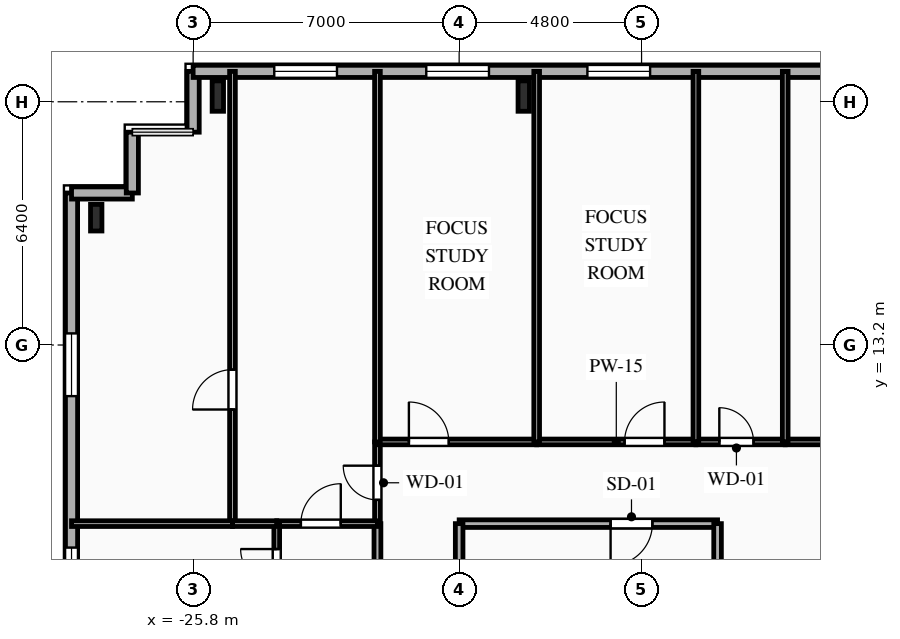
"""IFC4 building model, lengths in metres.
Left out: names, types, materials, properties, quantities, classifications, styles, units other than length and angle.
Written with IfcOpenShell. Run it as: python <this file> out.ifc"""

import sys

from ifc_helpers import new_model, si_unit, direction, frame, frame_2d, origin, origin_2d, place, context, subcontext, project, spatial, rectangle, i_section, extrude, element, fill, save


model = new_model("IFC4")
c1 = context("Model", 3, precision=1e-05, world=origin(), true_north=direction((0.0, 1.0)))
c2 = subcontext(c1, "Body", "Model", "MODEL_VIEW")
j1 = project(units=[si_unit("LENGTHUNIT", "METRE"), si_unit("PLANEANGLEUNIT", "RADIAN")], contexts=[c1])
p1 = place(None, origin())
s1 = spatial("IfcSite", under=j1, at=p1, CompositionType="ELEMENT")
p2 = place(p1, origin())
s2 = spatial("IfcBuilding", under=s1, at=p2, CompositionType="ELEMENT")
p3 = place(p2, frame((0.0, 0.0, 131.0)))
s3 = spatial("IfcBuildingStorey", under=s2, at=p3, CompositionType="ELEMENT", Elevation=131.0)
for number, where, z_axis, x_axis in (
    (1, (-17.1, 19.75, 0.0), (0.0, 0.0, 1.0), (1.0, 0.0, 0.0)),
    (2, (-25.15, 19.75, 0.0), (0.0, 0.0, 1.0), (1.0, 0.0, 0.0)),
):
    element("IfcColumn", number, at=place(p3, frame(where, z_axis=z_axis, x_axis=x_axis)), inside=s3, PredefinedType="COLUMN", context=c2, shape_type="SweptSolid", body=[
        extrude(i_section(OverallWidth=0.3, OverallDepth=0.8, WebThickness=0.018, FlangeThickness=0.033, FilletRadius=0.03, at=origin_2d()), origin(), (0.0, 0.0, 1.0), 3.35),
    ])
p4 = place(p3, frame((-28.35, 16.55, 0.0), z_axis=(0.0, 0.0, 1.0), x_axis=(1.0, 0.0, 0.0)))
e3 = element("IfcColumn", 3, at=p4, inside=s3, PredefinedType="COLUMN", context=c2, shape_type="SweptSolid", body=[
    extrude(i_section(OverallWidth=0.3, OverallDepth=0.7, WebThickness=0.017, FlangeThickness=0.032, FilletRadius=0.027, at=origin_2d()), origin(), (0.0, 0.0, 1.0), 3.35),
])
p5 = place(p3, frame((-29.0, -12.4, 0.0), z_axis=(0.0, 0.0, 1.0), x_axis=(0.0, 1.0, 0.0)))
e4 = element("IfcWall", 4, at=p5, inside=s3, PredefinedType="SOLIDWALL", context=c2, shape_type="SweptSolid", body=[
    extrude(rectangle(XDim=29.6, YDim=0.32, at=frame_2d((14.8, 0.0))), origin(), (0.0, 0.0, 1.0), 3.04),
])
p6 = place(p5, frame((2.855, 0.0, 0.85)))
e5 = element("IfcOpeningElement", 5, at=p6, cuts=e4, PredefinedType="OPENING", context=c2, shape_type="SweptSolid", body=[
    extrude(rectangle(XDim=1.65, YDim=1.85, at=frame_2d((0.825, 0.925))), frame((0.0, 0.17, 0.0), z_axis=(0.0, -1.0, 0.0), x_axis=(1.0, 0.0, 0.0)), (0.0, 0.0, 1.0), 0.34),
])
p7 = place(p5, frame((9.865, 0.0, 0.85)))
e6 = element("IfcOpeningElement", 6, at=p7, cuts=e4, PredefinedType="OPENING", context=c2, shape_type="SweptSolid", body=[
    extrude(rectangle(XDim=1.95, YDim=1.85, at=frame_2d((0.975, 0.925))), frame((0.0, 0.17, 0.0), z_axis=(0.0, -1.0, 0.0), x_axis=(1.0, 0.0, 0.0)), (0.0, 0.0, 1.0), 0.34),
])
p8 = place(p5, frame((13.13, 0.0, 0.85)))
e7 = element("IfcOpeningElement", 7, at=p8, cuts=e4, PredefinedType="OPENING", context=c2, shape_type="SweptSolid", body=[
    extrude(rectangle(XDim=1.5, YDim=1.85, at=frame_2d((0.75, 0.925))), frame((0.0, 0.17, 0.0), z_axis=(0.0, -1.0, 0.0), x_axis=(1.0, 0.0, 0.0)), (0.0, 0.0, 1.0), 0.34),
])
p9 = place(p5, frame((15.93, 0.0, 0.85)))
e8 = element("IfcOpeningElement", 8, at=p9, cuts=e4, PredefinedType="OPENING", context=c2, shape_type="SweptSolid", body=[
    extrude(rectangle(XDim=1.5, YDim=1.85, at=frame_2d((0.75, 0.925))), frame((0.0, 0.17, 0.0), z_axis=(0.0, -1.0, 0.0), x_axis=(1.0, 0.0, 0.0)), (0.0, 0.0, 1.0), 0.34),
])
p10 = place(p5, frame((18.77, 0.0, 0.85)))
e9 = element("IfcOpeningElement", 9, at=p10, cuts=e4, PredefinedType="OPENING", context=c2, shape_type="SweptSolid", body=[
    extrude(rectangle(XDim=1.5, YDim=1.85, at=frame_2d((0.75, 0.925))), frame((0.0, 0.17, 0.0), z_axis=(0.0, -1.0, 0.0), x_axis=(1.0, 0.0, 0.0)), (0.0, 0.0, 1.0), 0.34),
])
p11 = place(p5, frame((24.255, 0.0, 0.85)))
e10 = element("IfcOpeningElement", 10, at=p11, cuts=e4, PredefinedType="OPENING", context=c2, shape_type="SweptSolid", body=[
    extrude(rectangle(XDim=1.65, YDim=1.85, at=frame_2d((0.825, 0.925))), frame((0.0, 0.17, 0.0), z_axis=(0.0, -1.0, 0.0), x_axis=(1.0, 0.0, 0.0)), (0.0, 0.0, 1.0), 0.34),
])
for number, where, z_axis, x_axis in (
    (11, (-29.0, 17.2, 0.0), (0.0, 0.0, 1.0), (1.0, 0.0, 0.0)),
    (12, (-27.4, 17.2, 0.0), (0.0, 0.0, 1.0), (0.0, 1.0, 0.0)),
):
    element("IfcWall", number, at=place(p3, frame(where, z_axis=z_axis, x_axis=x_axis)), inside=s3, PredefinedType="SOLIDWALL", context=c2, shape_type="SweptSolid", body=[
        extrude(rectangle(XDim=1.6, YDim=0.32, at=frame_2d((0.8, 0.0))), origin(), (0.0, 0.0, 1.0), 3.04),
    ])
p12 = place(p3, frame((-25.8, 18.8, 0.0), z_axis=(0.0, 0.0, 1.0), x_axis=(0.0, 1.0, 0.0)))
e13 = element("IfcWall", 13, at=p12, inside=s3, PredefinedType="SOLIDWALL", context=c2, shape_type="SweptSolid", body=[
    extrude(rectangle(XDim=1.6, YDim=0.32, at=frame_2d((0.8, 0.0))), origin(), (0.0, 0.0, 1.0), 3.04),
])
p13 = place(p3, frame((-25.8, 20.4, 0.0), z_axis=(0.0, 0.0, 1.0), x_axis=(1.0, 0.0, 0.0)))
e14 = element("IfcWall", 14, at=p13, inside=s3, PredefinedType="SOLIDWALL", context=c2, shape_type="SweptSolid", body=[
    extrude(rectangle(XDim=49.6, YDim=0.32, at=frame_2d((24.8, 0.0))), origin(), (0.0, 0.0, 1.0), 3.04),
])
p14 = place(p13, frame((47.4, 0.0, 0.0)))
e15 = element("IfcOpeningElement", 15, at=p14, cuts=e14, PredefinedType="OPENING", context=c2, shape_type="SweptSolid", body=[
    extrude(rectangle(XDim=1.2, YDim=2.2, at=frame_2d((0.6, 1.1))), frame((0.0, 0.17, 0.0), z_axis=(0.0, -1.0, 0.0), x_axis=(1.0, 0.0, 0.0)), (0.0, 0.0, 1.0), 0.34),
])
p15 = place(p13, frame((2.135, 0.0, 0.85)))
e16 = element("IfcOpeningElement", 16, at=p15, cuts=e14, PredefinedType="OPENING", context=c2, shape_type="SweptSolid", body=[
    extrude(rectangle(XDim=1.65, YDim=1.85, at=frame_2d((0.825, 0.925))), frame((0.0, 0.17, 0.0), z_axis=(0.0, -1.0, 0.0), x_axis=(1.0, 0.0, 0.0)), (0.0, 0.0, 1.0), 0.34),
])
p16 = place(p13, frame((6.135, 0.0, 0.85)))
e17 = element("IfcOpeningElement", 17, at=p16, cuts=e14, PredefinedType="OPENING", context=c2, shape_type="SweptSolid", body=[
    extrude(rectangle(XDim=1.65, YDim=1.85, at=frame_2d((0.825, 0.925))), frame((0.0, 0.17, 0.0), z_axis=(0.0, -1.0, 0.0), x_axis=(1.0, 0.0, 0.0)), (0.0, 0.0, 1.0), 0.34),
])
p17 = place(p13, frame((10.375, 0.0, 0.85)))
e18 = element("IfcOpeningElement", 18, at=p17, cuts=e14, PredefinedType="OPENING", context=c2, shape_type="SweptSolid", body=[
    extrude(rectangle(XDim=1.65, YDim=1.85, at=frame_2d((0.825, 0.925))), frame((0.0, 0.17, 0.0), z_axis=(0.0, -1.0, 0.0), x_axis=(1.0, 0.0, 0.0)), (0.0, 0.0, 1.0), 0.34),
])
p18 = place(p13, frame((17.89, 0.0, 0.85)))
e19 = element("IfcOpeningElement", 19, at=p18, cuts=e14, PredefinedType="OPENING", context=c2, shape_type="SweptSolid", body=[
    extrude(rectangle(XDim=1.5, YDim=1.85, at=frame_2d((0.75, 0.925))), frame((0.0, 0.17, 0.0), z_axis=(0.0, -1.0, 0.0), x_axis=(1.0, 0.0, 0.0)), (0.0, 0.0, 1.0), 0.34),
])
p19 = place(p13, frame((25.592, 0.0, 0.85)))
e20 = element("IfcOpeningElement", 20, at=p19, cuts=e14, PredefinedType="OPENING", context=c2, shape_type="SweptSolid", body=[
    extrude(rectangle(XDim=2.2, YDim=1.85, at=frame_2d((1.1, 0.925))), frame((0.0, 0.17, 0.0), z_axis=(0.0, -1.0, 0.0), x_axis=(1.0, 0.0, 0.0)), (0.0, 0.0, 1.0), 0.34),
])
p20 = place(p13, frame((33.1, 0.0, 0.85)))
e21 = element("IfcOpeningElement", 21, at=p20, cuts=e14, PredefinedType="OPENING", context=c2, shape_type="SweptSolid", body=[
    extrude(rectangle(XDim=2.2, YDim=1.85, at=frame_2d((1.1, 0.925))), frame((0.0, 0.17, 0.0), z_axis=(0.0, -1.0, 0.0), x_axis=(1.0, 0.0, 0.0)), (0.0, 0.0, 1.0), 0.34),
])
p21 = place(p13, frame((39.092, 0.0, 0.85)))
e22 = element("IfcOpeningElement", 22, at=p21, cuts=e14, PredefinedType="OPENING", context=c2, shape_type="SweptSolid", body=[
    extrude(rectangle(XDim=1.65, YDim=1.85, at=frame_2d((0.825, 0.925))), frame((0.0, 0.17, 0.0), z_axis=(0.0, -1.0, 0.0), x_axis=(1.0, 0.0, 0.0)), (0.0, 0.0, 1.0), 0.34),
])
p22 = place(p13, frame((43.855, 0.0, 0.85)))
e23 = element("IfcOpeningElement", 23, at=p22, cuts=e14, PredefinedType="OPENING", context=c2, shape_type="SweptSolid", body=[
    extrude(rectangle(XDim=1.65, YDim=1.85, at=frame_2d((0.825, 0.925))), frame((0.0, 0.17, 0.0), z_axis=(0.0, -1.0, 0.0), x_axis=(1.0, 0.0, 0.0)), (0.0, 0.0, 1.0), 0.34),
])
p23 = place(p3, frame((-12.0, 8.5, 0.0), z_axis=(0.0, 0.0, 1.0), x_axis=(-1.0, 0.0, 0.0)))
e24 = element("IfcWall", 24, at=p23, inside=s3, PredefinedType="PARTITIONING", context=c2, shape_type="SweptSolid", body=[
    extrude(rectangle(XDim=6.8, YDim=0.2, at=frame_2d((3.4, 0.0))), origin(), (0.0, 0.0, 1.0), 3.04),
])
p24 = place(p23, frame((1.715, 0.0, 0.0)))
e25 = element("IfcOpeningElement", 25, at=p24, cuts=e24, PredefinedType="OPENING", context=c2, shape_type="SweptSolid", body=[
    extrude(rectangle(XDim=1.1, YDim=2.15, at=frame_2d((0.55, 1.075))), frame((0.0, 0.11, 0.0), z_axis=(0.0, -1.0, 0.0), x_axis=(1.0, 0.0, 0.0)), (0.0, 0.0, 1.0), 0.22),
])
p25 = place(p3, frame((-18.8, 8.5, 0.0), z_axis=(0.0, 0.0, 1.0), x_axis=(0.0, -1.0, 0.0)))
e26 = element("IfcWall", 26, at=p25, inside=s3, PredefinedType="PARTITIONING", context=c2, shape_type="SweptSolid", body=[
    extrude(rectangle(XDim=2.9, YDim=0.2, at=frame_2d((1.45, 0.0))), origin(), (0.0, 0.0, 1.0), 2.525),
])
p26 = place(p3, frame((-12.0, 5.6, 0.0), z_axis=(0.0, 0.0, 1.0), x_axis=(0.0, 1.0, 0.0)))
e27 = element("IfcWall", 27, at=p26, inside=s3, PredefinedType="PARTITIONING", context=c2, shape_type="SweptSolid", body=[
    extrude(rectangle(XDim=2.9, YDim=0.2, at=frame_2d((1.45, 0.0))), origin(), (0.0, 0.0, 1.0), 3.04),
])
p27 = place(p3, frame((-20.95, 8.5, 0.0), z_axis=(0.0, 0.0, 1.0), x_axis=(0.0, 1.0, 0.0)))
e28 = element("IfcWall", 28, at=p27, inside=s3, PredefinedType="PARTITIONING", context=c2, shape_type="SweptSolid", body=[
    extrude(rectangle(XDim=2.15, YDim=0.15, at=frame_2d((1.075, 0.0))), origin(), (0.0, 0.0, 1.0), 3.04),
])
p28 = place(p27, frame((0.625, 0.0, 0.0)))
e29 = element("IfcOpeningElement", 29, at=p28, cuts=e28, PredefinedType="OPENING", context=c2, shape_type="SweptSolid", body=[
    extrude(rectangle(XDim=0.9, YDim=2.1, at=frame_2d((0.45, 1.05))), frame((0.0, 0.085, 0.0), z_axis=(0.0, -1.0, 0.0), x_axis=(1.0, 0.0, 0.0)), (0.0, 0.0, 1.0), 0.17),
])
p29 = place(p3, frame((-20.95, 10.65, 0.0), z_axis=(0.0, 0.0, 1.0), x_axis=(1.0, 0.0, 0.0)))
e30 = element("IfcWall", 30, at=p29, inside=s3, PredefinedType="PARTITIONING", context=c2, shape_type="SweptSolid", body=[
    extrude(rectangle(XDim=4.19, YDim=0.15, at=frame_2d((2.095, 0.0))), origin(), (0.0, 0.0, 1.0), 3.04),
])
p30 = place(p29, frame((0.827, 0.0, 0.0)))
e31 = element("IfcOpeningElement", 31, at=p30, cuts=e30, PredefinedType="OPENING", context=c2, shape_type="SweptSolid", body=[
    extrude(rectangle(XDim=1.05, YDim=2.15, at=frame_2d((0.525, 1.075))), frame((0.0, 0.085, 0.0), z_axis=(0.0, -1.0, 0.0), x_axis=(1.0, 0.0, 0.0)), (0.0, 0.0, 1.0), 0.17),
])
p31 = place(p3, frame((-16.76, 10.65, 0.0), z_axis=(0.0, 0.0, 1.0), x_axis=(1.0, 0.0, 0.0)))
e32 = element("IfcWall", 32, at=p31, inside=s3, PredefinedType="PARTITIONING", context=c2, shape_type="SweptSolid", body=[
    extrude(rectangle(XDim=4.19, YDim=0.15, at=frame_2d((2.095, 0.0))), origin(), (0.0, 0.0, 1.0), 3.04),
])
p32 = place(p31, frame((2.312, 0.0, 0.0)))
e33 = element("IfcOpeningElement", 33, at=p32, cuts=e32, PredefinedType="OPENING", context=c2, shape_type="SweptSolid", body=[
    extrude(rectangle(XDim=1.05, YDim=2.15, at=frame_2d((0.525, 1.075))), frame((0.0, 0.085, 0.0), z_axis=(0.0, -1.0, 0.0), x_axis=(1.0, 0.0, 0.0)), (0.0, 0.0, 1.0), 0.17),
])
p33 = place(p3, frame((-12.57, 10.65, 0.0), z_axis=(0.0, 0.0, 1.0), x_axis=(1.0, 0.0, 0.0)))
e34 = element("IfcWall", 34, at=p33, inside=s3, PredefinedType="PLUMBINGWALL", context=c2, shape_type="SweptSolid", body=[
    extrude(rectangle(XDim=2.35, YDim=0.15, at=frame_2d((1.175, 0.0))), origin(), (0.0, 0.0, 1.0), 3.04),
])
p34 = place(p33, frame((0.616, 0.0, 0.0)))
e35 = element("IfcOpeningElement", 35, at=p34, cuts=e34, PredefinedType="OPENING", context=c2, shape_type="SweptSolid", body=[
    extrude(rectangle(XDim=0.9, YDim=2.1, at=frame_2d((0.45, 1.05))), frame((0.0, 0.085, 0.0), z_axis=(0.0, -1.0, 0.0), x_axis=(1.0, 0.0, 0.0)), (0.0, 0.0, 1.0), 0.17),
])
p35 = place(p3, frame((-10.22, 10.65, 0.0), z_axis=(0.0, 0.0, 1.0), x_axis=(1.0, 0.0, 0.0)))
e36 = element("IfcWall", 36, at=p35, inside=s3, PredefinedType="PARTITIONING", context=c2, shape_type="SweptSolid", body=[
    extrude(rectangle(XDim=6.03, YDim=0.15, at=frame_2d((3.015, 0.0))), origin(), (0.0, 0.0, 1.0), 3.04),
])
p36 = place(p35, frame((4.01, 0.0, 0.0)))
e37 = element("IfcOpeningElement", 37, at=p36, cuts=e36, PredefinedType="OPENING", context=c2, shape_type="SweptSolid", body=[
    extrude(rectangle(XDim=0.95, YDim=2.1, at=frame_2d((0.475, 1.05))), frame((0.0, 0.085, 0.0), z_axis=(0.0, -1.0, 0.0), x_axis=(1.0, 0.0, 0.0)), (0.0, 0.0, 1.0), 0.17),
])
p37 = place(p3, frame((-20.95, -5.6, 0.0), z_axis=(0.0, 0.0, 1.0), x_axis=(0.0, 1.0, 0.0)))
e38 = element("IfcWall", 38, at=p37, inside=s3, PredefinedType="PARTITIONING", context=c2, shape_type="SweptSolid", body=[
    extrude(rectangle(XDim=14.1, YDim=0.18, at=frame_2d((7.05, 0.0))), origin(), (0.0, 0.0, 1.0), 3.04),
])
p38 = place(p37, frame((5.058, 0.0, 0.0)))
e39 = element("IfcOpeningElement", 39, at=p38, cuts=e38, PredefinedType="OPENING", context=c2, shape_type="SweptSolid", body=[
    extrude(rectangle(XDim=1.0, YDim=2.15, at=frame_2d((0.5, 1.075))), frame((0.0, 0.1, 0.0), z_axis=(0.0, -1.0, 0.0), x_axis=(1.0, 0.0, 0.0)), (0.0, 0.0, 1.0), 0.2),
])
p39 = place(p3, frame((-23.6, 8.5, 0.0), z_axis=(0.0, 0.0, 1.0), x_axis=(1.0, 0.0, 0.0)))
e40 = element("IfcWall", 40, at=p39, inside=s3, PredefinedType="PARTITIONING", context=c2, shape_type="SweptSolid", body=[
    extrude(rectangle(XDim=2.65, YDim=0.15, at=frame_2d((1.325, 0.0))), origin(), (0.0, 0.0, 1.0), 3.04),
])
p40 = place(p39, frame((0.635, 0.0, 0.0)))
e41 = element("IfcOpeningElement", 41, at=p40, cuts=e40, PredefinedType="OPENING", context=c2, shape_type="SweptSolid", body=[
    extrude(rectangle(XDim=1.05, YDim=2.15, at=frame_2d((0.525, 1.075))), frame((0.0, 0.085, 0.0), z_axis=(0.0, -1.0, 0.0), x_axis=(1.0, 0.0, 0.0)), (0.0, 0.0, 1.0), 0.17),
])
p41 = place(p3, frame((-23.6, 5.68, 0.0), z_axis=(0.0, 0.0, 1.0), x_axis=(0.0, 1.0, 0.0)))
e42 = element("IfcWall", 42, at=p41, inside=s3, PredefinedType="PARTITIONING", context=c2, shape_type="SweptSolid", body=[
    extrude(rectangle(XDim=2.82, YDim=0.15, at=frame_2d((1.41, 0.0))), origin(), (0.0, 0.0, 1.0), 2.695),
])
p42 = place(p41, frame((1.201, 0.0, 0.0)))
e43 = element("IfcOpeningElement", 43, at=p42, cuts=e42, PredefinedType="OPENING", context=c2, shape_type="SweptSolid", body=[
    extrude(rectangle(XDim=0.95, YDim=2.1, at=frame_2d((0.475, 1.05))), frame((0.0, 0.085, 0.0), z_axis=(0.0, -1.0, 0.0), x_axis=(1.0, 0.0, 0.0)), (0.0, 0.0, 1.0), 0.17),
])
p43 = place(p3, frame((-24.765, 8.5, 0.0), z_axis=(0.0, 0.0, 1.0), x_axis=(0.0, 1.0, 0.0)))
e44 = element("IfcWall", 44, at=p43, inside=s3, PredefinedType="PARTITIONING", context=c2, shape_type="SweptSolid", body=[
    extrude(rectangle(XDim=11.9, YDim=0.15, at=frame_2d((5.95, 0.0))), origin(), (0.0, 0.0, 1.0), 3.04),
])
p44 = place(p43, frame((3.002, 0.0, 0.0)))
e45 = element("IfcOpeningElement", 45, at=p44, cuts=e44, PredefinedType="OPENING", context=c2, shape_type="SweptSolid", body=[
    extrude(rectangle(XDim=1.05, YDim=2.15, at=frame_2d((0.525, 1.075))), frame((0.0, 0.085, 0.0), z_axis=(0.0, -1.0, 0.0), x_axis=(1.0, 0.0, 0.0)), (0.0, 0.0, 1.0), 0.17),
])
p45 = place(p3, frame((-23.6, 8.5, 0.0), z_axis=(0.0, 0.0, 1.0), x_axis=(-1.0, 0.0, 0.0)))
e46 = element("IfcWall", 46, at=p45, inside=s3, PredefinedType="PARTITIONING", context=c2, shape_type="SweptSolid", body=[
    extrude(rectangle(XDim=1.165, YDim=0.15, at=frame_2d((0.583, 0.0))), origin(), (0.0, 0.0, 1.0), 3.04),
])
p46 = place(p3, frame((-20.95, 20.4, 0.0), z_axis=(0.0, 0.0, 1.0), x_axis=(0.0, -1.0, 0.0)))
e47 = element("IfcWall", 47, at=p46, inside=s3, PredefinedType="PARTITIONING", context=c2, shape_type="SweptSolid", body=[
    extrude(rectangle(XDim=9.75, YDim=0.15, at=frame_2d((4.875, 0.0))), origin(), (0.0, 0.0, 1.0), 3.04),
])
p47 = place(p3, frame((-24.765, 8.5, 0.0), z_axis=(0.0, 0.0, 1.0), x_axis=(-1.0, 0.0, 0.0)))
e48 = element("IfcWall", 48, at=p47, inside=s3, PredefinedType="PARTITIONING", context=c2, shape_type="SweptSolid", body=[
    extrude(rectangle(XDim=4.235, YDim=0.15, at=frame_2d((2.118, 0.0))), origin(), (0.0, 0.0, 1.0), 3.04),
])
p48 = place(p3, frame((-16.76, 20.4, 0.0), z_axis=(0.0, 0.0, 1.0), x_axis=(0.0, -1.0, 0.0)))
e49 = element("IfcWall", 49, at=p48, inside=s3, PredefinedType="PARTITIONING", context=c2, shape_type="SweptSolid", body=[
    extrude(rectangle(XDim=9.75, YDim=0.15, at=frame_2d((4.875, 0.0))), origin(), (0.0, 0.0, 1.0), 3.04),
])
for number, where, z_axis, x_axis in (
    (50, (-12.57, 20.4, 0.0), (0.0, 0.0, 1.0), (0.0, -1.0, 0.0)),
    (51, (-10.22, 20.4, 0.0), (0.0, 0.0, 1.0), (0.0, -1.0, 0.0)),
):
    element("IfcWall", number, at=place(p3, frame(where, z_axis=z_axis, x_axis=x_axis)), inside=s3, PredefinedType="PLUMBINGWALL", context=c2, shape_type="SweptSolid", body=[
        extrude(rectangle(XDim=9.75, YDim=0.15, at=frame_2d((4.875, 0.0))), origin(), (0.0, 0.0, 1.0), 3.04),
    ])
p49 = place(p10, origin())
e52 = element("IfcWindow", 52, at=p49, inside=s3, PartitioningType="SINGLE_PANEL", PredefinedType="WINDOW", context=c2, shape_type="SweptSolid", body=[
    extrude(rectangle(XDim=1.5, YDim=1.85, at=frame_2d((0.75, 0.925))), frame((0.0, 0.03, 0.0), z_axis=(0.0, -1.0, 0.0), x_axis=(1.0, 0.0, 0.0)), (0.0, 0.0, 1.0), 0.06),
])
fill(e9, e52)
p50 = place(p11, origin())
e53 = element("IfcWindow", 53, at=p50, inside=s3, PartitioningType="SINGLE_PANEL", PredefinedType="WINDOW", context=c2, shape_type="SweptSolid", body=[
    extrude(rectangle(XDim=1.65, YDim=1.85, at=frame_2d((0.825, 0.925))), frame((0.0, 0.03, 0.0), z_axis=(0.0, -1.0, 0.0), x_axis=(1.0, 0.0, 0.0)), (0.0, 0.0, 1.0), 0.06),
])
fill(e10, e53)
p51 = place(p15, origin())
e54 = element("IfcWindow", 54, at=p51, inside=s3, PartitioningType="SINGLE_PANEL", PredefinedType="WINDOW", context=c2, shape_type="SweptSolid", body=[
    extrude(rectangle(XDim=1.65, YDim=1.85, at=frame_2d((0.825, 0.925))), frame((0.0, 0.03, 0.0), z_axis=(0.0, -1.0, 0.0), x_axis=(1.0, 0.0, 0.0)), (0.0, 0.0, 1.0), 0.06),
])
fill(e16, e54)
p52 = place(p16, origin())
e55 = element("IfcWindow", 55, at=p52, inside=s3, PartitioningType="SINGLE_PANEL", PredefinedType="WINDOW", context=c2, shape_type="SweptSolid", body=[
    extrude(rectangle(XDim=1.65, YDim=1.85, at=frame_2d((0.825, 0.925))), frame((0.0, 0.03, 0.0), z_axis=(0.0, -1.0, 0.0), x_axis=(1.0, 0.0, 0.0)), (0.0, 0.0, 1.0), 0.06),
])
fill(e17, e55)
p53 = place(p17, origin())
e56 = element("IfcWindow", 56, at=p53, inside=s3, PartitioningType="SINGLE_PANEL", PredefinedType="WINDOW", context=c2, shape_type="SweptSolid", body=[
    extrude(rectangle(XDim=1.65, YDim=1.85, at=frame_2d((0.825, 0.925))), frame((0.0, 0.03, 0.0), z_axis=(0.0, -1.0, 0.0), x_axis=(1.0, 0.0, 0.0)), (0.0, 0.0, 1.0), 0.06),
])
fill(e18, e56)
p54 = place(p24, origin())
e57 = element("IfcDoor", 57, at=p54, inside=s3, OperationType="SINGLE_SWING_RIGHT", PredefinedType="DOOR", context=c2, shape_type="SweptSolid", body=[
    extrude(rectangle(XDim=1.1, YDim=2.15, at=frame_2d((0.55, 1.075))), frame((0.0, 0.025, 0.0), z_axis=(0.0, -1.0, 0.0), x_axis=(1.0, 0.0, 0.0)), (0.0, 0.0, 1.0), 0.05),
])
fill(e25, e57)
p55 = place(p28, origin())
e58 = element("IfcDoor", 58, at=p55, inside=s3, OperationType="SINGLE_SWING_RIGHT", PredefinedType="DOOR", context=c2, shape_type="SweptSolid", body=[
    extrude(rectangle(XDim=0.9, YDim=2.1, at=frame_2d((0.45, 1.05))), frame((0.0, 0.025, 0.0), z_axis=(0.0, -1.0, 0.0), x_axis=(1.0, 0.0, 0.0)), (0.0, 0.0, 1.0), 0.05),
])
fill(e29, e58)
p56 = place(p30, origin())
e59 = element("IfcDoor", 59, at=p56, inside=s3, OperationType="SINGLE_SWING_LEFT", PredefinedType="DOOR", context=c2, shape_type="SweptSolid", body=[
    extrude(rectangle(XDim=1.05, YDim=2.15, at=frame_2d((0.525, 1.075))), frame((0.0, 0.025, 0.0), z_axis=(0.0, -1.0, 0.0), x_axis=(1.0, 0.0, 0.0)), (0.0, 0.0, 1.0), 0.05),
])
fill(e31, e59)
p57 = place(p32, origin())
e60 = element("IfcDoor", 60, at=p57, inside=s3, OperationType="SINGLE_SWING_RIGHT", PredefinedType="DOOR", context=c2, shape_type="SweptSolid", body=[
    extrude(rectangle(XDim=1.05, YDim=2.15, at=frame_2d((0.525, 1.075))), frame((0.0, 0.025, 0.0), z_axis=(0.0, -1.0, 0.0), x_axis=(1.0, 0.0, 0.0)), (0.0, 0.0, 1.0), 0.05),
])
fill(e33, e60)
p58 = place(p34, origin())
e61 = element("IfcDoor", 61, at=p58, inside=s3, OperationType="SINGLE_SWING_LEFT", PredefinedType="DOOR", context=c2, shape_type="SweptSolid", body=[
    extrude(rectangle(XDim=0.9, YDim=2.1, at=frame_2d((0.45, 1.05))), frame((0.0, 0.025, 0.0), z_axis=(0.0, -1.0, 0.0), x_axis=(1.0, 0.0, 0.0)), (0.0, 0.0, 1.0), 0.05),
])
fill(e35, e61)
p59 = place(p40, origin())
e62 = element("IfcDoor", 62, at=p59, inside=s3, OperationType="SINGLE_SWING_RIGHT", PredefinedType="DOOR", context=c2, shape_type="SweptSolid", body=[
    extrude(rectangle(XDim=1.05, YDim=2.15, at=frame_2d((0.525, 1.075))), frame((0.0, 0.025, 0.0), z_axis=(0.0, -1.0, 0.0), x_axis=(1.0, 0.0, 0.0)), (0.0, 0.0, 1.0), 0.05),
])
fill(e41, e62)
p60 = place(p42, origin())
e63 = element("IfcDoor", 63, at=p60, inside=s3, OperationType="SINGLE_SWING_RIGHT", PredefinedType="DOOR", context=c2, shape_type="SweptSolid", body=[
    extrude(rectangle(XDim=0.95, YDim=2.1, at=frame_2d((0.475, 1.05))), frame((0.0, 0.025, 0.0), z_axis=(0.0, -1.0, 0.0), x_axis=(1.0, 0.0, 0.0)), (0.0, 0.0, 1.0), 0.05),
])
fill(e43, e63)
p61 = place(p44, origin())
e64 = element("IfcDoor", 64, at=p61, inside=s3, OperationType="SINGLE_SWING_LEFT", PredefinedType="DOOR", context=c2, shape_type="SweptSolid", body=[
    extrude(rectangle(XDim=1.05, YDim=2.15, at=frame_2d((0.525, 1.075))), frame((0.0, 0.025, 0.0), z_axis=(0.0, -1.0, 0.0), x_axis=(1.0, 0.0, 0.0)), (0.0, 0.0, 1.0), 0.05),
])
fill(e45, e64)
save(model, sys.argv[1])
